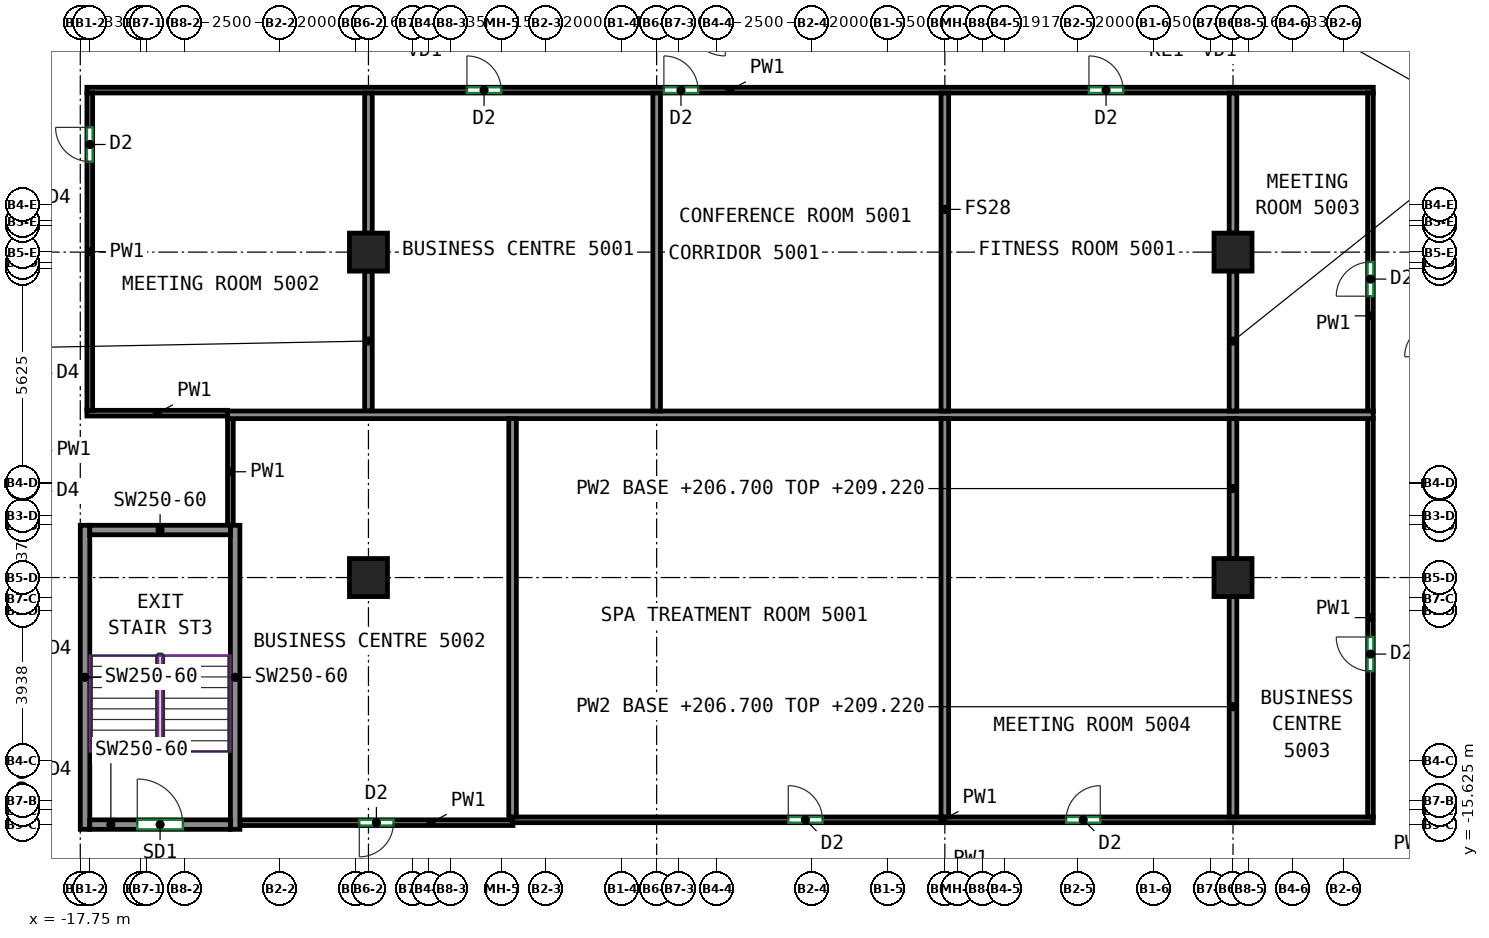
"""IFC4 building model, lengths in metres.
Left out: names, types, materials, properties, quantities, classifications, styles, units other than length and angle.
Written with IfcOpenShell. Run it as: python <this file> out.ifc"""

import sys

from ifc_helpers import new_model, si_unit, direction, frame, frame_2d, origin, origin_2d, place, context, subcontext, project, spatial, rectangle, extrude, source, transform, mapped, element, fill, save


model = new_model("IFC4")
c1 = context("Model", 3, precision=1e-05, world=origin(), true_north=direction((0.0, 1.0)))
c2 = subcontext(c1, "Body", "Model", "MODEL_VIEW")
j1 = project(units=[si_unit("LENGTHUNIT", "METRE"), si_unit("PLANEANGLEUNIT", "RADIAN")], contexts=[c1])
p1 = place(None, origin())
s1 = spatial("IfcSite", under=j1, at=p1, CompositionType="ELEMENT")
p2 = place(p1, origin())
s2 = spatial("IfcBuilding", under=s1, at=p2, CompositionType="ELEMENT")
p3 = place(p2, frame((0.0, 0.0, 206.7)))
s3 = spatial("IfcBuildingStorey", under=s2, at=p3, CompositionType="ELEMENT", Elevation=206.7)
m1 = source(origin(), c2, "Body", "SweptSolid", [
    extrude(rectangle(XDim=1.0, YDim=1.0, at=origin_2d()), origin(), (0.0, 0.0, 1.0), 3.12),
])
for number, where, z_axis, x_axis in (
    (1, (-10.167, -9.125, 0.0), (0.0, 0.0, 1.0), (1.0, 0.0, 0.0)),
    (2, (-10.167, -0.562, 0.0), (0.0, 0.0, 1.0), (1.0, 0.0, 0.0)),
    (3, (12.583, -9.125, 0.0), (0.0, 0.0, 1.0), (1.0, 0.0, 0.0)),
    (4, (12.583, -0.562, 0.0), (0.0, 0.0, 1.0), (1.0, 0.0, 0.0)),
):
    element("IfcColumn", number, at=place(p3, frame(where, z_axis=z_axis, x_axis=x_axis)), inside=s3, PredefinedType="COLUMN", context=c2, shape_type="MappedRepresentation", body=[
        mapped(m1, transform((0.0, 0.0, 0.0))),
    ])
m2 = source(origin(), c2, "Body", "SweptSolid", [
    extrude(rectangle(XDim=8.0, YDim=0.25, at=frame_2d((4.0, 0.0))), origin(), (0.0, 0.0, 1.0), 3.12),
])
for number, where, z_axis, x_axis in (
    (5, (-17.625, -15.75, 0.0), (0.0, 0.0, 1.0), (0.0, 1.0, 0.0)),
    (6, (-13.675, -15.75, 0.0), (0.0, 0.0, 1.0), (0.0, 1.0, 0.0)),
):
    element("IfcWall", number, at=place(p3, frame(where, z_axis=z_axis, x_axis=x_axis)), inside=s3, PredefinedType="SHEAR", context=c2, shape_type="MappedRepresentation", body=[
        mapped(m2, transform((0.0, 0.0, 0.0))),
    ])
m3 = source(origin(), c2, "Body", "SweptSolid", [
    extrude(rectangle(XDim=3.7, YDim=0.25, at=frame_2d((1.85, 0.0))), origin(), (0.0, 0.0, 1.0), 3.12),
])
p4 = place(p3, frame((-17.5, -15.625, 0.0), z_axis=(0.0, 0.0, 1.0), x_axis=(1.0, 0.0, 0.0)))
e7 = element("IfcWall", 7, at=p4, inside=s3, PredefinedType="SHEAR", context=c2, shape_type="MappedRepresentation", body=[
    mapped(m3, transform((0.0, 0.0, 0.0))),
])
p5 = place(p4, frame((1.25, 0.0, 0.0)))
e8 = element("IfcOpeningElement", 8, at=p5, cuts=e7, PredefinedType="OPENING", context=c2, shape_type="SweptSolid", body=[
    extrude(rectangle(XDim=1.2, YDim=2.1, at=frame_2d((0.6, 1.05))), frame((0.0, 0.135, 0.0), z_axis=(0.0, -1.0, 0.0), x_axis=(1.0, 0.0, 0.0)), (0.0, 0.0, 1.0), 0.27),
])
p6 = place(p3, frame((-17.5, -7.875, 0.0), z_axis=(0.0, 0.0, 1.0), x_axis=(1.0, 0.0, 0.0)))
e9 = element("IfcWall", 9, at=p6, inside=s3, PredefinedType="SHEAR", context=c2, shape_type="MappedRepresentation", body=[
    mapped(m3, transform((0.0, 0.0, 0.0))),
])
p7 = place(p3, frame((-17.575, -4.8, 0.0), z_axis=(0.0, 0.0, 1.0), x_axis=(1.0, 0.0, 0.0)))
e10 = element("IfcWall", 10, at=p7, inside=s3, PredefinedType="PARTITIONING", context=c2, shape_type="SweptSolid", body=[
    extrude(rectangle(XDim=3.702, YDim=0.15, at=frame_2d((1.851, 0.0))), origin(), (0.0, 0.0, 1.0), 3.12),
])
p8 = place(p3, frame((-17.575, 3.7, 0.0), z_axis=(0.0, 0.0, 1.0), x_axis=(1.0, 0.0, 0.0)))
e11 = element("IfcWall", 11, at=p8, inside=s3, PredefinedType="PARTITIONING", context=c2, shape_type="SweptSolid", body=[
    extrude(rectangle(XDim=33.85, YDim=0.15, at=frame_2d((16.925, 0.0))), origin(), (0.0, 0.0, 1.0), 3.12),
])
p9 = place(p8, frame((10.0, 0.0, 0.0)))
e12 = element("IfcOpeningElement", 12, at=p9, cuts=e11, PredefinedType="OPENING", context=c2, shape_type="SweptSolid", body=[
    extrude(rectangle(XDim=0.9, YDim=2.1, at=frame_2d((0.45, 1.05))), frame((0.0, 0.085, 0.0), z_axis=(0.0, -1.0, 0.0), x_axis=(1.0, 0.0, 0.0)), (0.0, 0.0, 1.0), 0.17),
])
p10 = place(p8, frame((15.182, 0.0, 0.0)))
e13 = element("IfcOpeningElement", 13, at=p10, cuts=e11, PredefinedType="OPENING", context=c2, shape_type="SweptSolid", body=[
    extrude(rectangle(XDim=0.9, YDim=2.1, at=frame_2d((0.45, 1.05))), frame((0.0, 0.085, 0.0), z_axis=(0.0, -1.0, 0.0), x_axis=(1.0, 0.0, 0.0)), (0.0, 0.0, 1.0), 0.17),
])
p11 = place(p8, frame((26.367, 0.0, 0.0)))
e14 = element("IfcOpeningElement", 14, at=p11, cuts=e11, PredefinedType="OPENING", context=c2, shape_type="SweptSolid", body=[
    extrude(rectangle(XDim=0.9, YDim=2.1, at=frame_2d((0.45, 1.05))), frame((0.0, 0.085, 0.0), z_axis=(0.0, -1.0, 0.0), x_axis=(1.0, 0.0, 0.0)), (0.0, 0.0, 1.0), 0.17),
])
p12 = place(p3, frame((-17.5, -4.725, 0.0), z_axis=(0.0, 0.0, 1.0), x_axis=(0.0, 1.0, 0.0)))
e15 = element("IfcWall", 15, at=p12, inside=s3, PredefinedType="PARTITIONING", context=c2, shape_type="SweptSolid", body=[
    extrude(rectangle(XDim=8.35, YDim=0.15, at=frame_2d((4.175, 0.0))), origin(), (0.0, 0.0, 1.0), 3.12),
])
p13 = place(p12, frame((6.545, 0.0, 0.0)))
e16 = element("IfcOpeningElement", 16, at=p13, cuts=e15, PredefinedType="OPENING", context=c2, shape_type="SweptSolid", body=[
    extrude(rectangle(XDim=0.9, YDim=2.1, at=frame_2d((0.45, 1.05))), frame((0.0, 0.085, 0.0), z_axis=(0.0, -1.0, 0.0), x_axis=(1.0, 0.0, 0.0)), (0.0, 0.0, 1.0), 0.17),
])
p14 = place(p3, frame((16.2, -4.753, 0.0), z_axis=(0.0, 0.0, 1.0), x_axis=(0.0, 1.0, 0.0)))
e17 = element("IfcWall", 17, at=p14, inside=s3, PredefinedType="PARTITIONING", context=c2, shape_type="SweptSolid", body=[
    extrude(rectangle(XDim=8.378, YDim=0.15, at=frame_2d((4.189, 0.0))), origin(), (0.0, 0.0, 1.0), 3.12),
])
p15 = place(p14, frame((3.031, 0.0, 0.0)))
e18 = element("IfcOpeningElement", 18, at=p15, cuts=e17, PredefinedType="OPENING", context=c2, shape_type="SweptSolid", body=[
    extrude(rectangle(XDim=0.9, YDim=2.1, at=frame_2d((0.45, 1.05))), frame((0.0, 0.085, 0.0), z_axis=(0.0, -1.0, 0.0), x_axis=(1.0, 0.0, 0.0)), (0.0, 0.0, 1.0), 0.17),
])
p16 = place(p3, frame((-13.8, -7.75, 0.0), z_axis=(0.0, 0.0, 1.0), x_axis=(0.0, 1.0, 0.0)))
e19 = element("IfcWall", 19, at=p16, inside=s3, PredefinedType="PARTITIONING", context=c2, shape_type="SweptSolid", body=[
    extrude(rectangle(XDim=2.817, YDim=0.15, at=frame_2d((1.408, 0.0))), origin(), (0.0, 0.0, 1.0), 3.12),
])
p17 = place(p3, frame((-6.365, -15.575, 0.0), z_axis=(0.0, 0.0, 1.0), x_axis=(-1.0, 0.0, 0.0)))
e20 = element("IfcWall", 20, at=p17, inside=s3, PredefinedType="PARTITIONING", context=c2, shape_type="SweptSolid", body=[
    extrude(rectangle(XDim=7.185, YDim=0.15, at=frame_2d((3.593, 0.0))), origin(), (0.0, 0.0, 1.0), 3.12),
])
p18 = place(p17, frame((3.143, 0.0, 0.0)))
e21 = element("IfcOpeningElement", 21, at=p18, cuts=e20, PredefinedType="OPENING", context=c2, shape_type="SweptSolid", body=[
    extrude(rectangle(XDim=0.9, YDim=2.1, at=frame_2d((0.45, 1.05))), frame((0.0, 0.085, 0.0), z_axis=(0.0, -1.0, 0.0), x_axis=(1.0, 0.0, 0.0)), (0.0, 0.0, 1.0), 0.17),
])
p19 = place(p3, frame((-6.385, -15.5, 0.0), z_axis=(0.0, 0.0, 1.0), x_axis=(1.0, 0.0, 0.0)))
e22 = element("IfcWall", 22, at=p19, inside=s3, PredefinedType="PARTITIONING", context=c2, shape_type="SweptSolid", body=[
    extrude(rectangle(XDim=22.66, YDim=0.15, at=frame_2d((11.33, 0.0))), origin(), (0.0, 0.0, 1.0), 3.12),
])
p20 = place(p19, frame((7.266, 0.0, 0.0)))
e23 = element("IfcOpeningElement", 23, at=p20, cuts=e22, PredefinedType="OPENING", context=c2, shape_type="SweptSolid", body=[
    extrude(rectangle(XDim=0.9, YDim=2.1, at=frame_2d((0.45, 1.05))), frame((0.0, 0.085, 0.0), z_axis=(0.0, -1.0, 0.0), x_axis=(1.0, 0.0, 0.0)), (0.0, 0.0, 1.0), 0.17),
])
p21 = place(p19, frame((14.576, 0.0, 0.0)))
e24 = element("IfcOpeningElement", 24, at=p21, cuts=e22, PredefinedType="OPENING", context=c2, shape_type="SweptSolid", body=[
    extrude(rectangle(XDim=0.9, YDim=2.1, at=frame_2d((0.45, 1.05))), frame((0.0, 0.085, 0.0), z_axis=(0.0, -1.0, 0.0), x_axis=(1.0, 0.0, 0.0)), (0.0, 0.0, 1.0), 0.17),
])
p22 = place(p3, frame((16.2, -15.425, 0.0), z_axis=(0.0, 0.0, 1.0), x_axis=(0.0, 1.0, 0.0)))
e25 = element("IfcWall", 25, at=p22, inside=s3, PredefinedType="PARTITIONING", context=c2, shape_type="SweptSolid", body=[
    extrude(rectangle(XDim=10.492, YDim=0.15, at=frame_2d((5.246, 0.0))), origin(), (0.0, 0.0, 1.0), 3.12),
])
p23 = place(p22, frame((3.836, 0.0, 0.0)))
e26 = element("IfcOpeningElement", 26, at=p23, cuts=e25, PredefinedType="OPENING", context=c2, shape_type="SweptSolid", body=[
    extrude(rectangle(XDim=0.9, YDim=2.1, at=frame_2d((0.45, 1.05))), frame((0.0, 0.085, 0.0), z_axis=(0.0, -1.0, 0.0), x_axis=(1.0, 0.0, 0.0)), (0.0, 0.0, 1.0), 0.17),
])
p24 = place(p3, frame((-10.167, -0.062, 0.0), z_axis=(0.0, 0.0, 1.0), x_axis=(0.0, 1.0, 0.0)))
e27 = element("IfcWall", 27, at=p24, inside=s3, PredefinedType="PARTITIONING", context=c2, shape_type="SweptSolid", body=[
    extrude(rectangle(XDim=3.685, YDim=0.2, at=frame_2d((1.843, 0.0))), origin(), (0.0, 0.0, 1.0), 3.12),
])
p25 = place(p3, frame((-10.167, -4.743, 0.0), z_axis=(0.0, 0.0, 1.0), x_axis=(0.0, 1.0, 0.0)))
e28 = element("IfcWall", 28, at=p25, inside=s3, PredefinedType="PARTITIONING", context=c2, shape_type="SweptSolid", body=[
    extrude(rectangle(XDim=3.681, YDim=0.2, at=frame_2d((1.84, 0.0))), origin(), (0.0, 0.0, 1.0), 2.52),
])
p26 = place(p3, frame((-13.873, -4.843, 0.0), z_axis=(0.0, 0.0, 1.0), x_axis=(1.0, 0.0, 0.0)))
e29 = element("IfcWall", 29, at=p26, inside=s3, PredefinedType="PARTITIONING", context=c2, shape_type="SweptSolid", body=[
    extrude(rectangle(XDim=30.146, YDim=0.2, at=frame_2d((15.073, 0.0))), origin(), (0.0, 0.0, 1.0), 3.12),
])
for number, where, z_axis, x_axis in (
    (30, (-2.583, -4.743, 0.0), (0.0, 0.0, 1.0), (0.0, 1.0, 0.0)),
    (31, (5.0, -4.743, 0.0), (0.0, 0.0, 1.0), (0.0, 1.0, 0.0)),
):
    element("IfcWall", number, at=place(p3, frame(where, z_axis=z_axis, x_axis=x_axis)), inside=s3, PredefinedType="PARTITIONING", context=c2, shape_type="SweptSolid", body=[
        extrude(rectangle(XDim=8.366, YDim=0.2, at=frame_2d((4.183, 0.0))), origin(), (0.0, 0.0, 1.0), 3.12),
    ])
p27 = place(p3, frame((12.583, -0.062, 0.0), z_axis=(0.0, 0.0, 1.0), x_axis=(0.0, 1.0, 0.0)))
e32 = element("IfcWall", 32, at=p27, inside=s3, PredefinedType="PARTITIONING", context=c2, shape_type="SweptSolid", body=[
    extrude(rectangle(XDim=3.685, YDim=0.2, at=frame_2d((1.843, 0.0))), origin(), (0.0, 0.0, 1.0), 3.12),
])
p28 = place(p3, frame((12.583, -4.743, 0.0), z_axis=(0.0, 0.0, 1.0), x_axis=(0.0, 1.0, 0.0)))
e33 = element("IfcWall", 33, at=p28, inside=s3, PredefinedType="PARTITIONING", context=c2, shape_type="SweptSolid", body=[
    extrude(rectangle(XDim=3.681, YDim=0.2, at=frame_2d((1.84, 0.0))), origin(), (0.0, 0.0, 1.0), 2.52),
])
for number, where, z_axis, x_axis in (
    (34, (-6.375, -15.423, 0.0), (0.0, 0.0, 1.0), (0.0, 1.0, 0.0)),
    (35, (5.0, -15.423, 0.0), (0.0, 0.0, 1.0), (0.0, 1.0, 0.0)),
):
    element("IfcWall", number, at=place(p3, frame(where, z_axis=z_axis, x_axis=x_axis)), inside=s3, PredefinedType="PARTITIONING", context=c2, shape_type="SweptSolid", body=[
        extrude(rectangle(XDim=10.48, YDim=0.2, at=frame_2d((5.24, 0.0))), origin(), (0.0, 0.0, 1.0), 3.12),
    ])
p29 = place(p3, frame((12.583, -8.625, 0.0), z_axis=(0.0, 0.0, 1.0), x_axis=(0.0, 1.0, 0.0)))
e36 = element("IfcWall", 36, at=p29, inside=s3, PredefinedType="PARTITIONING", context=c2, shape_type="SweptSolid", body=[
    extrude(rectangle(XDim=3.682, YDim=0.2, at=frame_2d((1.841, 0.0))), origin(), (0.0, 0.0, 1.0), 2.52),
])
p30 = place(p3, frame((12.583, -15.423, 0.0), z_axis=(0.0, 0.0, 1.0), x_axis=(0.0, 1.0, 0.0)))
e37 = element("IfcWall", 37, at=p30, inside=s3, PredefinedType="PARTITIONING", context=c2, shape_type="SweptSolid", body=[
    extrude(rectangle(XDim=5.798, YDim=0.2, at=frame_2d((2.899, 0.0))), origin(), (0.0, 0.0, 1.0), 2.52),
])
p31 = place(p5, origin())
e38 = element("IfcDoor", 38, at=p31, inside=s3, OperationType="DOUBLE_DOOR_SINGLE_SWING", PredefinedType="DOOR", context=c2, shape_type="SweptSolid", body=[
    extrude(rectangle(XDim=1.2, YDim=2.1, at=frame_2d((0.6, 1.05))), frame((0.0, 0.025, 0.0), z_axis=(0.0, -1.0, 0.0), x_axis=(1.0, 0.0, 0.0)), (0.0, 0.0, 1.0), 0.05),
])
fill(e8, e38)
p32 = place(p18, origin())
e39 = element("IfcDoor", 39, at=p32, inside=s3, OperationType="SINGLE_SWING_RIGHT", PredefinedType="DOOR", context=c2, shape_type="SweptSolid", body=[
    extrude(rectangle(XDim=0.9, YDim=2.1, at=frame_2d((0.45, 1.05))), frame((0.0, 0.025, 0.0), z_axis=(0.0, -1.0, 0.0), x_axis=(1.0, 0.0, 0.0)), (0.0, 0.0, 1.0), 0.05),
])
fill(e21, e39)
p33 = place(p20, origin())
e40 = element("IfcDoor", 40, at=p33, inside=s3, OperationType="SINGLE_SWING_LEFT", PredefinedType="DOOR", context=c2, shape_type="SweptSolid", body=[
    extrude(rectangle(XDim=0.9, YDim=2.1, at=frame_2d((0.45, 1.05))), frame((0.0, 0.025, 0.0), z_axis=(0.0, -1.0, 0.0), x_axis=(1.0, 0.0, 0.0)), (0.0, 0.0, 1.0), 0.05),
])
fill(e23, e40)
p34 = place(p21, origin())
e41 = element("IfcDoor", 41, at=p34, inside=s3, OperationType="SINGLE_SWING_RIGHT", PredefinedType="DOOR", context=c2, shape_type="SweptSolid", body=[
    extrude(rectangle(XDim=0.9, YDim=2.1, at=frame_2d((0.45, 1.05))), frame((0.0, 0.025, 0.0), z_axis=(0.0, -1.0, 0.0), x_axis=(1.0, 0.0, 0.0)), (0.0, 0.0, 1.0), 0.05),
])
fill(e24, e41)
p35 = place(p23, origin())
e42 = element("IfcDoor", 42, at=p35, inside=s3, OperationType="SINGLE_SWING_RIGHT", PredefinedType="DOOR", context=c2, shape_type="SweptSolid", body=[
    extrude(rectangle(XDim=0.9, YDim=2.1, at=frame_2d((0.45, 1.05))), frame((0.0, 0.025, 0.0), z_axis=(0.0, -1.0, 0.0), x_axis=(1.0, 0.0, 0.0)), (0.0, 0.0, 1.0), 0.05),
])
fill(e26, e42)
p36 = place(p15, origin())
e43 = element("IfcDoor", 43, at=p36, inside=s3, OperationType="SINGLE_SWING_LEFT", PredefinedType="DOOR", context=c2, shape_type="SweptSolid", body=[
    extrude(rectangle(XDim=0.9, YDim=2.1, at=frame_2d((0.45, 1.05))), frame((0.0, 0.025, 0.0), z_axis=(0.0, -1.0, 0.0), x_axis=(1.0, 0.0, 0.0)), (0.0, 0.0, 1.0), 0.05),
])
fill(e18, e43)
p37 = place(p13, origin())
e44 = element("IfcDoor", 44, at=p37, inside=s3, OperationType="SINGLE_SWING_RIGHT", PredefinedType="DOOR", context=c2, shape_type="SweptSolid", body=[
    extrude(rectangle(XDim=0.9, YDim=2.1, at=frame_2d((0.45, 1.05))), frame((0.0, 0.025, 0.0), z_axis=(0.0, -1.0, 0.0), x_axis=(1.0, 0.0, 0.0)), (0.0, 0.0, 1.0), 0.05),
])
fill(e16, e44)
p38 = place(p9, origin())
e45 = element("IfcDoor", 45, at=p38, inside=s3, OperationType="SINGLE_SWING_LEFT", PredefinedType="DOOR", context=c2, shape_type="SweptSolid", body=[
    extrude(rectangle(XDim=0.9, YDim=2.1, at=frame_2d((0.45, 1.05))), frame((0.0, 0.025, 0.0), z_axis=(0.0, -1.0, 0.0), x_axis=(1.0, 0.0, 0.0)), (0.0, 0.0, 1.0), 0.05),
])
fill(e12, e45)
p39 = place(p10, origin())
e46 = element("IfcDoor", 46, at=p39, inside=s3, OperationType="SINGLE_SWING_LEFT", PredefinedType="DOOR", context=c2, shape_type="SweptSolid", body=[
    extrude(rectangle(XDim=0.9, YDim=2.1, at=frame_2d((0.45, 1.05))), frame((0.0, 0.025, 0.0), z_axis=(0.0, -1.0, 0.0), x_axis=(1.0, 0.0, 0.0)), (0.0, 0.0, 1.0), 0.05),
])
fill(e13, e46)
p40 = place(p11, origin())
e47 = element("IfcDoor", 47, at=p40, inside=s3, OperationType="SINGLE_SWING_LEFT", PredefinedType="DOOR", context=c2, shape_type="SweptSolid", body=[
    extrude(rectangle(XDim=0.9, YDim=2.1, at=frame_2d((0.45, 1.05))), frame((0.0, 0.025, 0.0), z_axis=(0.0, -1.0, 0.0), x_axis=(1.0, 0.0, 0.0)), (0.0, 0.0, 1.0), 0.05),
])
fill(e14, e47)
save(model, sys.argv[1])
